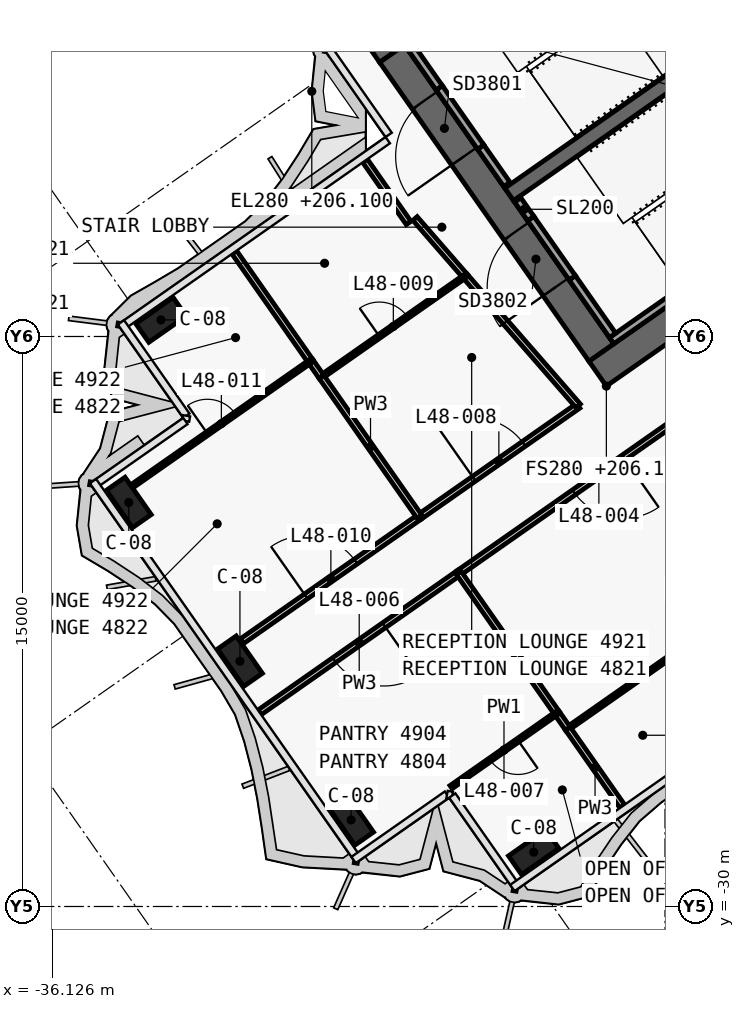
"""IFC4 building model, lengths in metres.
Left out: names, types, materials, properties, quantities, classifications, styles, units other than length and angle.
Written with IfcOpenShell. Run it as: python <this file> out.ifc"""

import sys

from ifc_helpers import new_model, si_unit, direction, frame, frame_2d, origin, origin_2d, place, context, subcontext, project, spatial, polyline, rectangle, outline, extrude, element, fill, save


model = new_model("IFC4")
c1 = context("Model", 3, precision=1e-05, world=origin(), true_north=direction((0.0, 1.0)))
c2 = subcontext(c1, "Body", "Model", "MODEL_VIEW")
j1 = project(units=[si_unit("LENGTHUNIT", "METRE"), si_unit("PLANEANGLEUNIT", "RADIAN")], contexts=[c1])
p1 = place(None, origin())
s1 = spatial("IfcSite", under=j1, at=p1, CompositionType="ELEMENT")
p2 = place(p1, origin())
s2 = spatial("IfcBuilding", under=s1, at=p2, CompositionType="ELEMENT")
p3 = place(p2, frame((0.0, 0.0, 206.1)))
s3 = spatial("IfcBuildingStorey", under=s2, at=p3, CompositionType="ELEMENT", Elevation=206.1)
p4 = place(p3, frame((0.029, 11.984, 0.0), z_axis=(0.0, 0.0, 1.0), x_axis=(-0.819151382952, -0.573577380837, 0.0)))
e1 = element("IfcWall", 1, at=p4, inside=s3, PredefinedType="SHEAR", context=c2, shape_type="SweptSolid", body=[
    extrude(outline(polyline([(33.898, 0.4), (0.56, 0.4), (-0.0, -0.4), (33.898, -0.4), (33.898, 0.4)])), origin(), (0.0, 0.0, 1.0), 3.9),
])
p5 = place(p3, frame((0.029, -0.712, 0.0), z_axis=(0.0, 0.0, 1.0), x_axis=(-0.819151758019, -0.573576845187, 0.0)))
e2 = element("IfcWall", 2, at=p5, inside=s3, PredefinedType="SHEAR", context=c2, shape_type="SweptSolid", body=[
    extrude(outline(polyline([(26.616, 0.4), (0.56, 0.4), (-0.0, -0.4), (26.616, -0.4), (26.616, 0.4)])), origin(), (0.0, 0.0, 1.0), 3.9),
])
p6 = place(p5, frame((2.966, 0.0, 0.0)))
e3 = element("IfcOpeningElement", 3, at=p6, cuts=e2, PredefinedType="OPENING", context=c2, shape_type="SweptSolid", body=[
    extrude(rectangle(XDim=2.4, YDim=2.1, at=frame_2d((1.2, 1.05))), frame((0.0, 0.41, 0.0), z_axis=(0.0, -1.0, 0.0), x_axis=(1.0, 0.0, 0.0)), (0.0, 0.0, 1.0), 0.82),
])
p7 = place(p5, frame((11.916, 0.0, 0.0)))
e4 = element("IfcOpeningElement", 4, at=p7, cuts=e2, PredefinedType="OPENING", context=c2, shape_type="SweptSolid", body=[
    extrude(rectangle(XDim=2.4, YDim=2.1, at=frame_2d((1.2, 1.05))), frame((0.0, 0.41, 0.0), z_axis=(0.0, -1.0, 0.0), x_axis=(1.0, 0.0, 0.0)), (0.0, 0.0, 1.0), 0.82),
])
p8 = place(p3, frame((-21.675, -15.421, 0.0), z_axis=(0.0, 0.0, 1.0), x_axis=(-0.573581815061, 0.819148278049, 0.0)))
e5 = element("IfcWall", 5, at=p8, inside=s3, PredefinedType="SHEAR", context=c2, shape_type="SweptSolid", body=[
    extrude(outline(polyline([(0.0, 0.4), (0.0, -0.4), (9.6, -0.4), (9.6, 0.4), (0.0, 0.4)])), origin(), (0.0, 0.0, 1.0), 3.9),
])
p9 = place(p8, frame((6.3, 0.0, 0.0)))
e6 = element("IfcOpeningElement", 6, at=p9, cuts=e5, PredefinedType="OPENING", context=c2, shape_type="SweptSolid", body=[
    extrude(rectangle(XDim=1.8, YDim=2.1, at=frame_2d((0.9, 1.05))), frame((0.0, 0.41, 0.0), z_axis=(0.0, -1.0, 0.0), x_axis=(1.0, 0.0, 0.0)), (0.0, 0.0, 1.0), 0.82),
])
p10 = place(p8, frame((2.1, 0.0, 0.0)))
e7 = element("IfcOpeningElement", 7, at=p10, cuts=e5, PredefinedType="OPENING", context=c2, shape_type="SweptSolid", body=[
    extrude(rectangle(XDim=1.8, YDim=2.1, at=frame_2d((0.9, 1.05))), frame((0.0, 0.41, 0.0), z_axis=(0.0, -1.0, 0.0), x_axis=(1.0, 0.0, 0.0)), (0.0, 0.0, 1.0), 0.82),
])
p11 = place(p3, frame((-2.638, 3.768, 0.0), z_axis=(0.0, 0.0, 1.0), x_axis=(-0.81915267502, -0.573575535572, 0.0)))
e8 = element("IfcWall", 8, at=p11, inside=s3, PredefinedType="SHEAR", context=c2, shape_type="SweptSolid", body=[
    extrude(outline(polyline([(26.2, 0.2), (0.0, 0.2), (0.0, -0.2), (26.2, -0.2), (26.2, 0.2)])), origin(), (0.0, 0.0, 1.0), 3.9),
])
p12 = place(p11, frame((1.169, 0.0, 0.0)))
e9 = element("IfcOpeningElement", 9, at=p12, cuts=e8, PredefinedType="OPENING", context=c2, shape_type="SweptSolid", body=[
    extrude(rectangle(XDim=1.1, YDim=2.1, at=frame_2d((0.55, 1.05))), frame((0.0, 0.21, 0.0), z_axis=(0.0, -1.0, 0.0), x_axis=(1.0, 0.0, 0.0)), (0.0, 0.0, 1.0), 0.42),
])
p13 = place(p11, frame((3.206, 0.0, 0.0)))
e10 = element("IfcOpeningElement", 10, at=p13, cuts=e8, PredefinedType="OPENING", context=c2, shape_type="SweptSolid", body=[
    extrude(rectangle(XDim=1.1, YDim=2.1, at=frame_2d((0.55, 1.05))), frame((0.0, 0.21, 0.0), z_axis=(0.0, -1.0, 0.0), x_axis=(1.0, 0.0, 0.0)), (0.0, 0.0, 1.0), 0.42),
])
p14 = place(p11, frame((5.244, 0.0, 0.0)))
e11 = element("IfcOpeningElement", 11, at=p14, cuts=e8, PredefinedType="OPENING", context=c2, shape_type="SweptSolid", body=[
    extrude(rectangle(XDim=1.1, YDim=2.1, at=frame_2d((0.55, 1.05))), frame((0.0, 0.21, 0.0), z_axis=(0.0, -1.0, 0.0), x_axis=(1.0, 0.0, 0.0)), (0.0, 0.0, 1.0), 0.42),
])
p15 = place(p11, frame((7.281, 0.0, 0.0)))
e12 = element("IfcOpeningElement", 12, at=p15, cuts=e8, PredefinedType="OPENING", context=c2, shape_type="SweptSolid", body=[
    extrude(rectangle(XDim=1.1, YDim=2.1, at=frame_2d((0.55, 1.05))), frame((0.0, 0.21, 0.0), z_axis=(0.0, -1.0, 0.0), x_axis=(1.0, 0.0, 0.0)), (0.0, 0.0, 1.0), 0.42),
])
p16 = place(p11, frame((9.688, 0.0, 0.0)))
e13 = element("IfcOpeningElement", 13, at=p16, cuts=e8, PredefinedType="OPENING", context=c2, shape_type="SweptSolid", body=[
    extrude(rectangle(XDim=1.1, YDim=2.1, at=frame_2d((0.55, 1.05))), frame((0.0, 0.21, 0.0), z_axis=(0.0, -1.0, 0.0), x_axis=(1.0, 0.0, 0.0)), (0.0, 0.0, 1.0), 0.42),
])
p17 = place(p11, frame((11.863, 0.0, 0.0)))
e14 = element("IfcOpeningElement", 14, at=p17, cuts=e8, PredefinedType="OPENING", context=c2, shape_type="SweptSolid", body=[
    extrude(rectangle(XDim=1.1, YDim=2.1, at=frame_2d((0.55, 1.05))), frame((0.0, 0.21, 0.0), z_axis=(0.0, -1.0, 0.0), x_axis=(1.0, 0.0, 0.0)), (0.0, 0.0, 1.0), 0.42),
])
p18 = place(p11, frame((14.552, 0.0, 0.0)))
e15 = element("IfcOpeningElement", 15, at=p18, cuts=e8, PredefinedType="OPENING", context=c2, shape_type="SweptSolid", body=[
    extrude(rectangle(XDim=1.0, YDim=2.1, at=frame_2d((0.5, 1.05))), frame((0.0, 0.21, 0.0), z_axis=(0.0, -1.0, 0.0), x_axis=(1.0, 0.0, 0.0)), (0.0, 0.0, 1.0), 0.42),
])
p19 = place(p11, frame((16.627, 0.0, 0.0)))
e16 = element("IfcOpeningElement", 16, at=p19, cuts=e8, PredefinedType="OPENING", context=c2, shape_type="SweptSolid", body=[
    extrude(rectangle(XDim=1.0, YDim=2.1, at=frame_2d((0.5, 1.05))), frame((0.0, 0.21, 0.0), z_axis=(0.0, -1.0, 0.0), x_axis=(1.0, 0.0, 0.0)), (0.0, 0.0, 1.0), 0.42),
])
for number, where, z_axis, x_axis in (
    (17, (-23.455, -28.57, 0.0), (0.0, 0.0, 1.0), (-0.819, -0.574, 0.0)),
    (18, (-33.263, -14.562, 0.0), (0.0, 0.0, 1.0), (-0.819, -0.574, 0.0)),
    (19, (-28.26, -27.723, 0.0), (0.0, 0.0, 1.0), (-0.574, 0.819, 0.0)),
    (20, (-31.185, -23.545, 0.0), (0.0, 0.0, 1.0), (-0.574, 0.819, 0.0)),
    (21, (-34.11, -19.367, 0.0), (0.0, 0.0, 1.0), (-0.574, 0.819, 0.0)),
):
    element("IfcColumn", number, at=place(p3, frame(where, z_axis=z_axis, x_axis=x_axis)), inside=s3, PredefinedType="COLUMN", context=c2, shape_type="SweptSolid", body=[
        extrude(rectangle(XDim=1.2, YDim=0.6, at=origin_2d()), origin(), (0.0, 0.0, 1.0), 3.9),
    ])
p20 = place(p3, frame((-24.162, -10.998, 0.0), z_axis=(0.0, 0.0, 1.0), x_axis=(-0.573612502218, 0.819126789514, 0.0)))
e22 = element("IfcWall", 22, at=p20, inside=s3, PredefinedType="SOLIDWALL", context=c2, shape_type="SweptSolid", body=[
    extrude(rectangle(XDim=1.2, YDim=0.2, at=frame_2d((0.6, 0.0))), origin(), (0.0, 0.0, 1.0), 3.62),
])
p21 = place(p3, frame((-25.94, -8.458, 0.0), z_axis=(0.0, 0.0, 1.0), x_axis=(-0.573619628835, 0.819121798889, 0.0)))
e23 = element("IfcWall", 23, at=p21, inside=s3, PredefinedType="SOLIDWALL", context=c2, shape_type="SweptSolid", body=[
    extrude(rectangle(XDim=1.25, YDim=0.2, at=frame_2d((0.625, 0.0))), origin(), (0.0, 0.0, 1.0), 3.62),
])
p22 = place(p3, frame((-24.85, -10.014, 2.15), z_axis=(0.0, 0.0, 1.0), x_axis=(-0.573505465124, 0.819201734296, 0.0)))
e24 = element("IfcWall", 24, at=p22, inside=s3, PredefinedType="SOLIDWALL", context=c2, shape_type="SweptSolid", body=[
    extrude(rectangle(XDim=1.9, YDim=0.2, at=frame_2d((0.95, 0.0))), origin(), (0.0, 0.0, 1.0), 1.47),
])
p23 = place(p3, frame((-14.851, -10.521, 0.0), z_axis=(0.0, 0.0, 1.0), x_axis=(-0.819141584393, -0.57359137434, 0.0)))
e25 = element("IfcWall", 25, at=p23, inside=s3, PredefinedType="SOLIDWALL", context=c2, shape_type="SweptSolid", body=[
    extrude(rectangle(XDim=8.0, YDim=0.2, at=frame_2d((4.0, 0.0))), origin(), (0.0, 0.0, 1.0), 3.62),
])
p24 = place(p3, frame((-21.38, -14.97, 0.0), z_axis=(0.0, 0.0, 1.0), x_axis=(-0.573559770908, 0.819163713305, 0.0)))
e26 = element("IfcWall", 26, at=p24, inside=s3, PredefinedType="SOLIDWALL", context=c2, shape_type="SweptSolid", body=[
    extrude(rectangle(XDim=1.85, YDim=0.2, at=frame_2d((0.925, 0.0))), origin(), (0.0, 0.0, 1.0), 3.62),
])
p25 = place(p3, frame((-23.531, -11.898, 0.0), z_axis=(0.0, 0.0, 1.0), x_axis=(-0.573708088123, 0.819059844958, 0.0)))
e27 = element("IfcWall", 27, at=p25, inside=s3, PredefinedType="SOLIDWALL", context=c2, shape_type="SweptSolid", body=[
    extrude(rectangle(XDim=0.6, YDim=0.2, at=frame_2d((0.3, 0.0))), origin(), (0.0, 0.0, 1.0), 3.62),
])
p26 = place(p3, frame((-22.441, -13.455, 2.15), z_axis=(0.0, 0.0, 1.0), x_axis=(-0.573591692345, 0.819141361715, 0.0)))
e28 = element("IfcWall", 28, at=p26, inside=s3, PredefinedType="SOLIDWALL", context=c2, shape_type="SweptSolid", body=[
    extrude(rectangle(XDim=1.9, YDim=0.2, at=frame_2d((0.95, 0.0))), origin(), (0.0, 0.0, 1.0), 1.47),
])
p27 = place(p3, frame((-26.46, -19.748, 0.0), z_axis=(0.0, 0.0, 1.0), x_axis=(0.819171182807, 0.573549102744, 0.0)))
e29 = element("IfcWall", 29, at=p27, inside=s3, PredefinedType="PARTITIONING", context=c2, shape_type="SweptSolid", body=[
    extrude(rectangle(XDim=5.099, YDim=0.15, at=frame_2d((2.55, 0.0))), origin(), (0.0, 0.0, 1.0), 3.62),
])
p28 = place(p27, frame((1.75, 0.0, 0.0)))
e30 = element("IfcOpeningElement", 30, at=p28, cuts=e29, PredefinedType="OPENING", context=c2, shape_type="SweptSolid", body=[
    extrude(rectangle(XDim=1.6, YDim=2.1, at=frame_2d((0.8, 1.05))), frame((0.0, 0.085, 0.0), z_axis=(0.0, -1.0, 0.0), x_axis=(1.0, 0.0, 0.0)), (0.0, 0.0, 1.0), 0.17),
])
p29 = place(p3, frame((-31.128, -23.017, 0.0), z_axis=(0.0, 0.0, 1.0), x_axis=(0.819159500015, 0.573565788323, 0.0)))
e31 = element("IfcWall", 31, at=p29, inside=s3, PredefinedType="PARTITIONING", context=c2, shape_type="SweptSolid", body=[
    extrude(rectangle(XDim=5.702, YDim=0.15, at=frame_2d((2.851, 0.0))), origin(), (0.0, 0.0, 1.0), 3.0),
])
p30 = place(p29, frame((2.051, 0.0, 0.0)))
e32 = element("IfcOpeningElement", 32, at=p30, cuts=e31, PredefinedType="OPENING", context=c2, shape_type="SweptSolid", body=[
    extrude(rectangle(XDim=1.6, YDim=2.1, at=frame_2d((0.8, 1.05))), frame((0.0, 0.085, 0.0), z_axis=(0.0, -1.0, 0.0), x_axis=(1.0, 0.0, 0.0)), (0.0, 0.0, 1.0), 0.17),
])
p31 = place(p3, frame((-18.052, -16.058, 0.0), z_axis=(0.0, 0.0, 1.0), x_axis=(-0.819142740634, -0.573589723117, 0.0)))
e33 = element("IfcWall", 33, at=p31, inside=s3, PredefinedType="PARTITIONING", context=c2, shape_type="SweptSolid", body=[
    extrude(rectangle(XDim=9.004, YDim=0.15, at=frame_2d((4.502, 0.0))), origin(), (0.0, 0.0, 1.0), 3.0),
])
p32 = place(p31, frame((3.702, 0.0, 0.0)))
e34 = element("IfcOpeningElement", 34, at=p32, cuts=e33, PredefinedType="OPENING", context=c2, shape_type="SweptSolid", body=[
    extrude(rectangle(XDim=1.6, YDim=2.1, at=frame_2d((0.8, 1.05))), frame((0.0, 0.085, 0.0), z_axis=(0.0, -1.0, 0.0), x_axis=(1.0, 0.0, 0.0)), (0.0, 0.0, 1.0), 0.17),
])
p33 = place(p3, frame((-25.424, -21.22, 0.0), z_axis=(0.0, 0.0, 1.0), x_axis=(-0.819154877477, -0.573572390118, 0.0)))
e35 = element("IfcWall", 35, at=p33, inside=s3, PredefinedType="PARTITIONING", context=c2, shape_type="SweptSolid", body=[
    extrude(rectangle(XDim=6.402, YDim=0.15, at=frame_2d((3.201, 0.0))), origin(), (0.0, 0.0, 1.0), 2.9),
])
p34 = place(p33, frame((2.401, 0.0, 0.0)))
e36 = element("IfcOpeningElement", 36, at=p34, cuts=e35, PredefinedType="OPENING", context=c2, shape_type="SweptSolid", body=[
    extrude(rectangle(XDim=1.6, YDim=2.1, at=frame_2d((0.8, 1.05))), frame((0.0, 0.085, 0.0), z_axis=(0.0, -1.0, 0.0), x_axis=(1.0, 0.0, 0.0)), (0.0, 0.0, 1.0), 0.17),
])
p35 = place(p3, frame((-26.746, -12.014, 0.0), z_axis=(0.0, 0.0, 1.0), x_axis=(-0.573568836472, 0.819157365729, 0.0)))
e37 = element("IfcWall", 37, at=p35, inside=s3, PredefinedType="PARTITIONING", context=c2, shape_type="SweptSolid", body=[
    extrude(rectangle(XDim=2.0, YDim=0.15, at=frame_2d((1.0, 0.0))), origin(), (0.0, 0.0, 1.0), 3.0),
])
p36 = place(p3, frame((-25.256, -13.413, 0.0), z_axis=(0.0, 0.0, 1.0), x_axis=(-0.656776293518, 0.75408547279, 0.0)))
e38 = element("IfcWall", 38, at=p36, inside=s3, PredefinedType="PARTITIONING", context=c2, shape_type="SweptSolid", body=[
    extrude(rectangle(XDim=2.012, YDim=0.15, at=frame_2d((1.006, 0.0))), origin(), (0.0, 0.0, 1.0), 3.62),
])
p37 = place(p3, frame((-22.284, -16.826, 0.0), z_axis=(0.0, 0.0, 1.0), x_axis=(-0.656755036803, 0.754103985955, 0.0)))
e39 = element("IfcWall", 39, at=p37, inside=s3, PredefinedType="PARTITIONING", context=c2, shape_type="SweptSolid", body=[
    extrude(rectangle(XDim=4.529, YDim=0.15, at=frame_2d((2.265, 0.0))), origin(), (0.0, 0.0, 1.0), 3.62),
])
p38 = place(p3, frame((-29.04, -16.06, 0.0), z_axis=(0.0, 0.0, 1.0), x_axis=(0.819135037256, 0.573600724145, 0.0)))
e40 = element("IfcWall", 40, at=p38, inside=s3, PredefinedType="PARTITIONING", context=c2, shape_type="SweptSolid", body=[
    extrude(rectangle(XDim=4.618, YDim=0.1, at=frame_2d((2.309, 0.0))), origin(), (0.0, 0.0, 1.0), 3.62),
])
p39 = place(p38, frame((1.859, 0.0, 0.0)))
e41 = element("IfcOpeningElement", 41, at=p39, cuts=e40, PredefinedType="OPENING", context=c2, shape_type="SweptSolid", body=[
    extrude(rectangle(XDim=0.9, YDim=2.1, at=frame_2d((0.45, 1.05))), frame((0.0, 0.06, 0.0), z_axis=(0.0, -1.0, 0.0), x_axis=(1.0, 0.0, 0.0)), (0.0, 0.0, 1.0), 0.12),
])
p40 = place(p3, frame((-29.326, -15.652, 0.0), z_axis=(0.0, 0.0, 1.0), x_axis=(-0.573593387921, 0.81914017441, 0.0)))
e42 = element("IfcWall", 42, at=p40, inside=s3, PredefinedType="PARTITIONING", context=c2, shape_type="SweptSolid", body=[
    extrude(rectangle(XDim=3.501, YDim=0.15, at=frame_2d((1.75, 0.0))), origin(), (0.0, 0.0, 1.0), 3.0),
])
p41 = place(p3, frame((-29.04, -16.06, 0.0), z_axis=(0.0, 0.0, 1.0), x_axis=(-0.573560455774, 0.819163233777, 0.0)))
e43 = element("IfcWall", 43, at=p41, inside=s3, PredefinedType="PARTITIONING", context=c2, shape_type="SweptSolid", body=[
    extrude(rectangle(XDim=0.501, YDim=0.15, at=frame_2d((0.25, 0.0))), origin(), (0.0, 0.0, 1.0), 3.62),
])
p42 = place(p3, frame((-26.458, -19.747, 0.0), z_axis=(0.0, 0.0, 1.0), x_axis=(-0.573560650686, 0.819163097304, 0.0)))
e44 = element("IfcWall", 44, at=p42, inside=s3, PredefinedType="PARTITIONING", context=c2, shape_type="SweptSolid", body=[
    extrude(rectangle(XDim=4.5, YDim=0.15, at=frame_2d((2.25, 0.0))), origin(), (0.0, 0.0, 1.0), 3.62),
])
p43 = place(p3, frame((-34.021, -18.937, 0.0), z_axis=(0.0, 0.0, 1.0), x_axis=(0.819141832764, 0.573591019644, 0.0)))
e45 = element("IfcWall", 45, at=p43, inside=s3, PredefinedType="PARTITIONING", context=c2, shape_type="SweptSolid", body=[
    extrude(rectangle(XDim=5.73, YDim=0.1, at=frame_2d((2.865, 0.0))), origin(), (0.0, 0.0, 1.0), 2.9),
])
p44 = place(p43, frame((2.415, 0.0, 0.0)))
e46 = element("IfcOpeningElement", 46, at=p44, cuts=e45, PredefinedType="OPENING", context=c2, shape_type="SweptSolid", body=[
    extrude(rectangle(XDim=0.9, YDim=2.1, at=frame_2d((0.45, 1.05))), frame((0.0, 0.06, 0.0), z_axis=(0.0, -1.0, 0.0), x_axis=(1.0, 0.0, 0.0)), (0.0, 0.0, 1.0), 0.12),
])
p45 = place(p3, frame((-15.185, -20.156, 0.0), z_axis=(0.0, 0.0, 1.0), x_axis=(-0.819154173185, -0.573573395961, 0.0)))
e47 = element("IfcWall", 47, at=p45, inside=s3, PredefinedType="PARTITIONING", context=c2, shape_type="SweptSolid", body=[
    extrude(rectangle(XDim=9.0, YDim=0.1, at=frame_2d((4.5, 0.0))), origin(), (0.0, 0.0, 1.0), 3.0),
])
p46 = place(p45, frame((4.05, 0.0, 0.0)))
e48 = element("IfcOpeningElement", 48, at=p46, cuts=e47, PredefinedType="OPENING", context=c2, shape_type="SweptSolid", body=[
    extrude(rectangle(XDim=0.9, YDim=2.1, at=frame_2d((0.45, 1.05))), frame((0.0, 0.06, 0.0), z_axis=(0.0, -1.0, 0.0), x_axis=(1.0, 0.0, 0.0)), (0.0, 0.0, 1.0), 0.12),
])
p47 = place(p3, frame((-21.124, -27.365, 0.0), z_axis=(0.0, 0.0, 1.0), x_axis=(-0.573560689761, 0.819163069945, 0.0)))
e49 = element("IfcWall", 49, at=p47, inside=s3, PredefinedType="PARTITIONING", context=c2, shape_type="SweptSolid", body=[
    extrude(rectangle(XDim=2.499, YDim=0.15, at=frame_2d((1.25, 0.0))), origin(), (0.0, 0.0, 1.0), 2.9),
])
p48 = place(p3, frame((-22.558, -25.317, 0.0), z_axis=(0.0, 0.0, 1.0), x_axis=(-0.573560455774, 0.819163233777, 0.0)))
e50 = element("IfcWall", 50, at=p48, inside=s3, PredefinedType="PARTITIONING", context=c2, shape_type="SweptSolid", body=[
    extrude(rectangle(XDim=0.501, YDim=0.15, at=frame_2d((0.25, 0.0))), origin(), (0.0, 0.0, 1.0), 3.62),
])
p49 = place(p3, frame((-22.844, -24.909, 0.0), z_axis=(0.0, 0.0, 1.0), x_axis=(-0.573589723117, 0.819142740634, 0.0)))
e51 = element("IfcWall", 51, at=p49, inside=s3, PredefinedType="PARTITIONING", context=c2, shape_type="SweptSolid", body=[
    extrude(rectangle(XDim=4.502, YDim=0.15, at=frame_2d((2.251, 0.0))), origin(), (0.0, 0.0, 1.0), 3.62),
])
p50 = place(p3, frame((-22.844, -24.909, 0.0), z_axis=(0.0, 0.0, 1.0), x_axis=(-0.819150951061, -0.57357799764, 0.0)))
e52 = element("IfcWall", 52, at=p50, inside=s3, PredefinedType="PARTITIONING", context=c2, shape_type="SweptSolid", body=[
    extrude(rectangle(XDim=3.4, YDim=0.1, at=frame_2d((1.7, 0.0))), origin(), (0.0, 0.0, 1.0), 3.0),
])
p51 = place(p50, frame((1.25, 0.0, 0.0)))
e53 = element("IfcOpeningElement", 53, at=p51, cuts=e52, PredefinedType="OPENING", context=c2, shape_type="SweptSolid", body=[
    extrude(rectangle(XDim=0.9, YDim=2.1, at=frame_2d((0.45, 1.05))), frame((0.0, 0.06, 0.0), z_axis=(0.0, -1.0, 0.0), x_axis=(1.0, 0.0, 0.0)), (0.0, 0.0, 1.0), 0.12),
])
p52 = place(p9, origin())
e54 = element("IfcDoor", 54, at=p52, inside=s3, OperationType="DOUBLE_DOOR_SINGLE_SWING", PredefinedType="DOOR", context=c2, shape_type="SweptSolid", body=[
    extrude(rectangle(XDim=1.8, YDim=2.1, at=frame_2d((0.9, 1.05))), frame((0.0, 0.025, 0.0), z_axis=(0.0, -1.0, 0.0), x_axis=(1.0, 0.0, 0.0)), (0.0, 0.0, 1.0), 0.05),
])
fill(e6, e54)
p53 = place(p10, origin())
e55 = element("IfcDoor", 55, at=p53, inside=s3, OperationType="DOUBLE_DOOR_SINGLE_SWING", PredefinedType="DOOR", context=c2, shape_type="SweptSolid", body=[
    extrude(rectangle(XDim=1.8, YDim=2.1, at=frame_2d((0.9, 1.05))), frame((0.0, 0.025, 0.0), z_axis=(0.0, -1.0, 0.0), x_axis=(1.0, 0.0, 0.0)), (0.0, 0.0, 1.0), 0.05),
])
fill(e7, e55)
p54 = place(p32, origin())
e56 = element("IfcDoor", 56, at=p54, inside=s3, OperationType="DOUBLE_DOOR_SINGLE_SWING", PredefinedType="DOOR", context=c2, shape_type="SweptSolid", body=[
    extrude(rectangle(XDim=1.6, YDim=2.1, at=frame_2d((0.8, 1.05))), frame((0.0, 0.025, 0.0), z_axis=(0.0, -1.0, 0.0), x_axis=(1.0, 0.0, 0.0)), (0.0, 0.0, 1.0), 0.05),
])
fill(e34, e56)
p55 = place(p34, origin())
e57 = element("IfcDoor", 57, at=p55, inside=s3, OperationType="DOUBLE_DOOR_SINGLE_SWING", PredefinedType="DOOR", context=c2, shape_type="SweptSolid", body=[
    extrude(rectangle(XDim=1.6, YDim=2.1, at=frame_2d((0.8, 1.05))), frame((0.0, 0.025, 0.0), z_axis=(0.0, -1.0, 0.0), x_axis=(1.0, 0.0, 0.0)), (0.0, 0.0, 1.0), 0.05),
])
fill(e36, e57)
p56 = place(p51, origin())
e58 = element("IfcDoor", 58, at=p56, inside=s3, OperationType="SINGLE_SWING_RIGHT", PredefinedType="DOOR", context=c2, shape_type="SweptSolid", body=[
    extrude(rectangle(XDim=0.9, YDim=2.1, at=frame_2d((0.45, 1.05))), frame((0.0, 0.025, 0.0), z_axis=(0.0, -1.0, 0.0), x_axis=(1.0, 0.0, 0.0)), (0.0, 0.0, 1.0), 0.05),
])
fill(e53, e58)
p57 = place(p28, origin())
e59 = element("IfcDoor", 59, at=p57, inside=s3, OperationType="DOUBLE_DOOR_SINGLE_SWING", PredefinedType="DOOR", context=c2, shape_type="SweptSolid", body=[
    extrude(rectangle(XDim=1.6, YDim=2.1, at=frame_2d((0.8, 1.05))), frame((0.0, 0.025, 0.0), z_axis=(0.0, -1.0, 0.0), x_axis=(1.0, 0.0, 0.0)), (0.0, 0.0, 1.0), 0.05),
])
fill(e30, e59)
p58 = place(p39, origin())
e60 = element("IfcDoor", 60, at=p58, inside=s3, OperationType="SINGLE_SWING_RIGHT", PredefinedType="DOOR", context=c2, shape_type="SweptSolid", body=[
    extrude(rectangle(XDim=0.9, YDim=2.1, at=frame_2d((0.45, 1.05))), frame((0.0, 0.025, 0.0), z_axis=(0.0, -1.0, 0.0), x_axis=(1.0, 0.0, 0.0)), (0.0, 0.0, 1.0), 0.05),
])
fill(e41, e60)
p59 = place(p30, origin())
e61 = element("IfcDoor", 61, at=p59, inside=s3, OperationType="DOUBLE_DOOR_SINGLE_SWING", PredefinedType="DOOR", context=c2, shape_type="SweptSolid", body=[
    extrude(rectangle(XDim=1.6, YDim=2.1, at=frame_2d((0.8, 1.05))), frame((0.0, 0.025, 0.0), z_axis=(0.0, -1.0, 0.0), x_axis=(1.0, 0.0, 0.0)), (0.0, 0.0, 1.0), 0.05),
])
fill(e32, e61)
p60 = place(p44, origin())
e62 = element("IfcDoor", 62, at=p60, inside=s3, OperationType="SINGLE_SWING_RIGHT", PredefinedType="DOOR", context=c2, shape_type="SweptSolid", body=[
    extrude(rectangle(XDim=0.9, YDim=2.1, at=frame_2d((0.45, 1.05))), frame((0.0, 0.025, 0.0), z_axis=(0.0, -1.0, 0.0), x_axis=(1.0, 0.0, 0.0)), (0.0, 0.0, 1.0), 0.05),
])
fill(e46, e62)
save(model, sys.argv[1])
